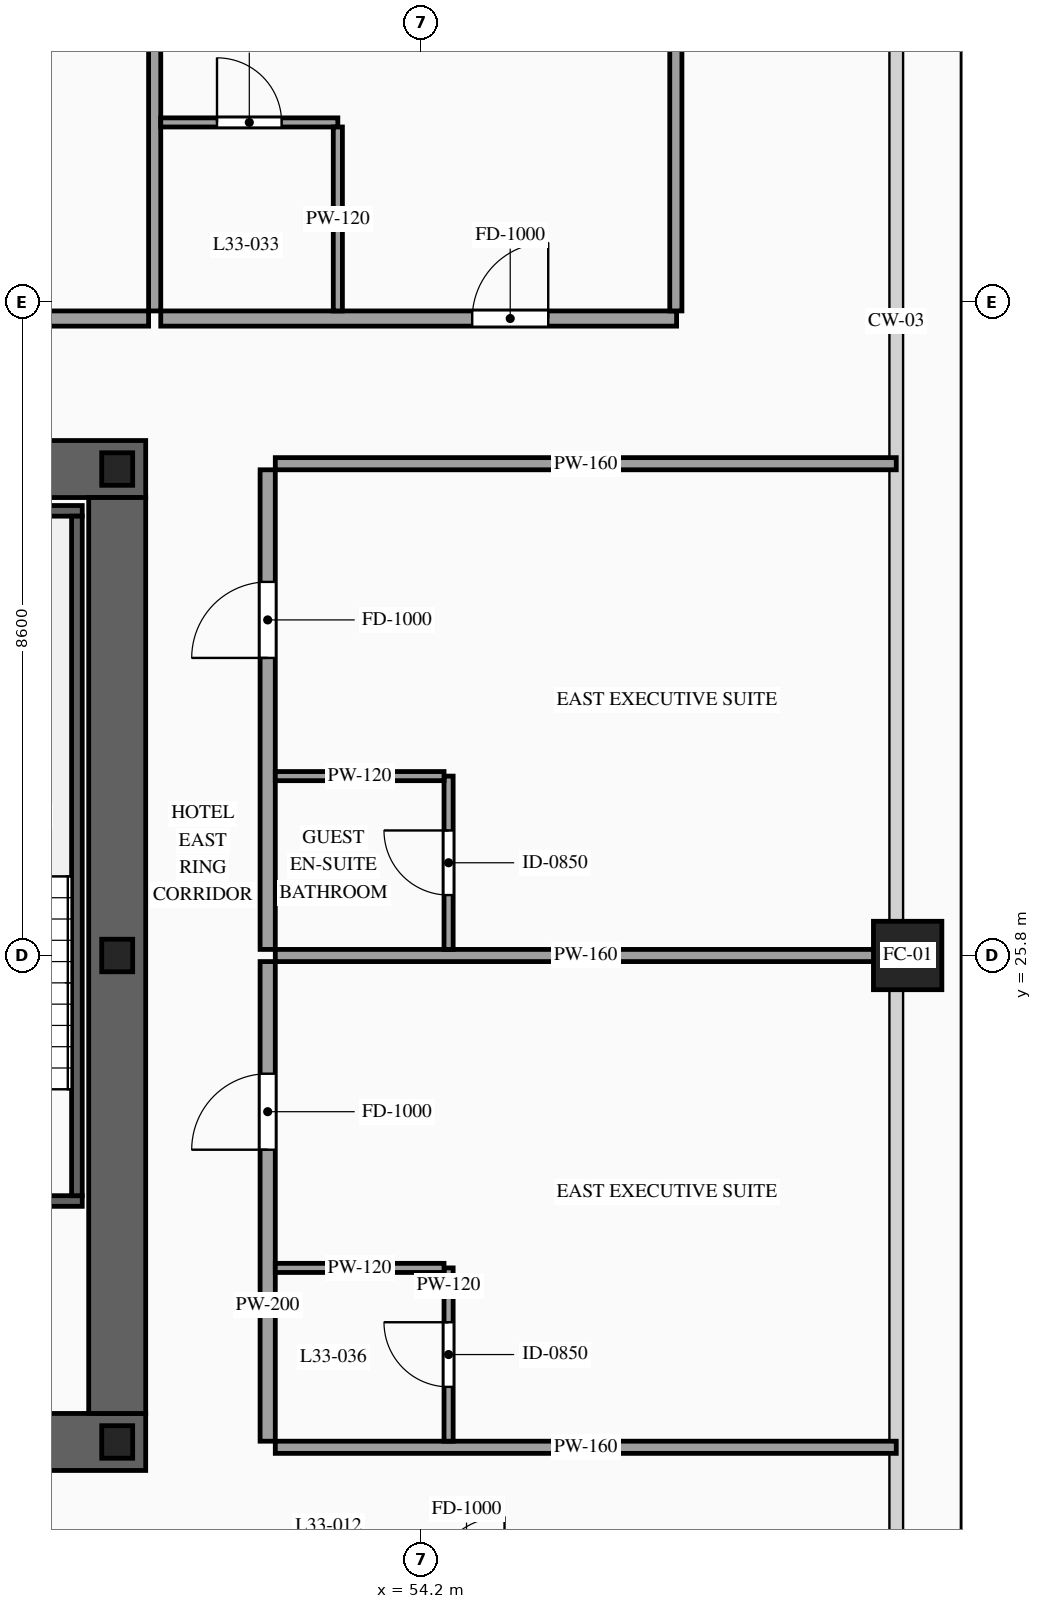
"""IFC4 building model, lengths in metres.
Left out: names, types, materials, properties, quantities, classifications, styles, units other than length and angle.
Written with IfcOpenShell. Run it as: python <this file> out.ifc"""

import sys

from ifc_helpers import new_model, si_unit, direction, frame, frame_2d, origin, origin_2d, place, context, subcontext, project, spatial, rectangle, hollow_rectangle, i_section, extrude, source, transform, mapped, element, fill, save


model = new_model("IFC4")
c1 = context("Model", 3, precision=1e-05, world=origin(), true_north=direction((0.0, 1.0)))
c2 = subcontext(c1, "Body", "Model", "MODEL_VIEW")
j1 = project(units=[si_unit("LENGTHUNIT", "METRE"), si_unit("PLANEANGLEUNIT", "RADIAN")], contexts=[c1])
p1 = place(None, origin())
s1 = spatial("IfcSite", under=j1, at=p1, CompositionType="ELEMENT")
p2 = place(p1, origin())
s2 = spatial("IfcBuilding", under=s1, at=p2, CompositionType="ELEMENT")
p3 = place(p2, frame((0.0, 0.0, 126.2)))
s3 = spatial("IfcBuildingStorey", under=s2, at=p3, CompositionType="ELEMENT", Elevation=126.2)
p4 = place(p3, frame((23.425, 19.4, 0.0), z_axis=(0.0, 0.0, 1.0), x_axis=(1.0, 0.0, 0.0)))
e1 = element("IfcWall", 1, at=p4, inside=s3, PredefinedType="SHEAR", context=c2, shape_type="SweptSolid", body=[
    extrude(rectangle(XDim=27.15, YDim=0.75, at=frame_2d((13.575, 0.0))), origin(), (0.0, 0.0, 1.0), 3.6),
])
p5 = place(p4, frame((2.025, 0.0, 0.0)))
e2 = element("IfcOpeningElement", 2, at=p5, cuts=e1, PredefinedType="OPENING", context=c2, shape_type="SweptSolid", body=[
    extrude(rectangle(XDim=1.1, YDim=2.2, at=frame_2d((0.55, 1.1))), frame((0.0, 0.39, 0.0), z_axis=(0.0, -1.0, 0.0), x_axis=(1.0, 0.0, 0.0)), (0.0, 0.0, 1.0), 0.78),
])
p6 = place(p4, frame((9.925, 0.0, 0.0)))
e3 = element("IfcOpeningElement", 3, at=p6, cuts=e1, PredefinedType="OPENING", context=c2, shape_type="SweptSolid", body=[
    extrude(rectangle(XDim=1.1, YDim=2.2, at=frame_2d((0.55, 1.1))), frame((0.0, 0.39, 0.0), z_axis=(0.0, -1.0, 0.0), x_axis=(1.0, 0.0, 0.0)), (0.0, 0.0, 1.0), 0.78),
])
p7 = place(p4, frame((23.125, 0.0, 0.0)))
e4 = element("IfcOpeningElement", 4, at=p7, cuts=e1, PredefinedType="OPENING", context=c2, shape_type="SweptSolid", body=[
    extrude(rectangle(XDim=1.1, YDim=2.2, at=frame_2d((0.55, 1.1))), frame((0.0, 0.39, 0.0), z_axis=(0.0, -1.0, 0.0), x_axis=(1.0, 0.0, 0.0)), (0.0, 0.0, 1.0), 0.78),
])
p8 = place(p4, frame((19.745, 0.0, 0.0)))
e5 = element("IfcOpeningElement", 5, at=p8, cuts=e1, PredefinedType="OPENING", context=c2, shape_type="SweptSolid", body=[
    extrude(rectangle(XDim=0.9, YDim=2.15, at=frame_2d((0.45, 1.075))), frame((0.0, 0.39, 0.0), z_axis=(0.0, -1.0, 0.0), x_axis=(1.0, 0.0, 0.0)), (0.0, 0.0, 1.0), 0.78),
])
p9 = place(p4, frame((18.305, 0.0, 0.0)))
e6 = element("IfcOpeningElement", 6, at=p9, cuts=e1, PredefinedType="OPENING", context=c2, shape_type="SweptSolid", body=[
    extrude(rectangle(XDim=0.9, YDim=2.15, at=frame_2d((0.45, 1.075))), frame((0.0, 0.39, 0.0), z_axis=(0.0, -1.0, 0.0), x_axis=(1.0, 0.0, 0.0)), (0.0, 0.0, 1.0), 0.78),
])
p10 = place(p3, frame((23.425, 32.2, 0.0), z_axis=(0.0, 0.0, 1.0), x_axis=(1.0, 0.0, 0.0)))
e7 = element("IfcWall", 7, at=p10, inside=s3, PredefinedType="SHEAR", context=c2, shape_type="SweptSolid", body=[
    extrude(rectangle(XDim=27.15, YDim=0.75, at=frame_2d((13.575, 0.0))), origin(), (0.0, 0.0, 1.0), 3.6),
])
p11 = place(p10, frame((4.645, 0.0, 0.0)))
e8 = element("IfcOpeningElement", 8, at=p11, cuts=e7, PredefinedType="OPENING", context=c2, shape_type="SweptSolid", body=[
    extrude(rectangle(XDim=0.9, YDim=2.15, at=frame_2d((0.45, 1.075))), frame((0.0, 0.39, 0.0), z_axis=(0.0, -1.0, 0.0), x_axis=(1.0, 0.0, 0.0)), (0.0, 0.0, 1.0), 0.78),
])
p12 = place(p10, frame((9.925, 0.0, 0.0)))
e9 = element("IfcOpeningElement", 9, at=p12, cuts=e7, PredefinedType="OPENING", context=c2, shape_type="SweptSolid", body=[
    extrude(rectangle(XDim=1.1, YDim=2.2, at=frame_2d((0.55, 1.1))), frame((0.0, 0.39, 0.0), z_axis=(0.0, -1.0, 0.0), x_axis=(1.0, 0.0, 0.0)), (0.0, 0.0, 1.0), 0.78),
])
p13 = place(p10, frame((15.775, 0.0, 0.0)))
e10 = element("IfcOpeningElement", 10, at=p13, cuts=e7, PredefinedType="OPENING", context=c2, shape_type="SweptSolid", body=[
    extrude(rectangle(XDim=1.1, YDim=2.2, at=frame_2d((0.55, 1.1))), frame((0.0, 0.39, 0.0), z_axis=(0.0, -1.0, 0.0), x_axis=(1.0, 0.0, 0.0)), (0.0, 0.0, 1.0), 0.78),
])
m1 = source(origin(), c2, "Body", "SweptSolid", [
    extrude(rectangle(XDim=12.05, YDim=0.75, at=frame_2d((6.025, 0.0))), origin(), (0.0, 0.0, 1.0), 3.6),
])
p14 = place(p3, frame((50.2, 19.775, 0.0), z_axis=(0.0, 0.0, 1.0), x_axis=(0.0, 1.0, 0.0)))
e11 = element("IfcWall", 11, at=p14, inside=s3, PredefinedType="SHEAR", context=c2, shape_type="MappedRepresentation", body=[
    mapped(m1, transform((0.0, 0.0, 0.0), scale=1.0)),
])
m2 = source(origin(), c2, "Body", "SweptSolid", [
    extrude(i_section(OverallWidth=0.407, OverallDepth=0.428, WebThickness=0.02, FlangeThickness=0.035, at=origin_2d()), origin(), (0.0, 0.0, 1.0), 3.6),
])
for number, where, z_axis, x_axis in (
    (12, (50.2, 19.4, 0.0), (0.0, 0.0, 1.0), (1.0, 0.0, 0.0)),
    (13, (50.2, 25.8, 0.0), (0.0, 0.0, 1.0), (1.0, 0.0, 0.0)),
    (14, (50.2, 32.2, 0.0), (0.0, 0.0, 1.0), (1.0, 0.0, 0.0)),
):
    element("IfcColumn", number, at=place(p3, frame(where, z_axis=z_axis, x_axis=x_axis)), inside=s3, PredefinedType="COLUMN", context=c2, shape_type="MappedRepresentation", body=[
        mapped(m2, transform((0.0, 0.0, 0.0), scale=1.0)),
    ])
m3 = source(origin(), c2, "Body", "SweptSolid", [
    extrude(hollow_rectangle(XDim=0.9, YDim=0.9, WallThickness=0.042, at=origin_2d()), origin(), (0.0, 0.0, 1.0), 3.6),
])
p15 = place(p3, frame((60.6, 25.8, 0.0), z_axis=(0.0, 0.0, 1.0), x_axis=(1.0, 0.0, 0.0)))
e15 = element("IfcColumn", 15, at=p15, inside=s3, PredefinedType="COLUMN", context=c2, shape_type="MappedRepresentation", body=[
    mapped(m3, transform((0.0, 0.0, 0.0), scale=1.0)),
])
p16 = place(p3, frame((46.46, 22.57, 0.0), z_axis=(0.0, 0.0, 1.0), x_axis=(1.0, 0.0, 0.0)))
e16 = element("IfcWall", 16, at=p16, inside=s3, PredefinedType="SOLIDWALL", context=c2, shape_type="SweptSolid", body=[
    extrude(rectangle(XDim=3.28, YDim=0.14, at=frame_2d((1.64, 0.0))), origin(), (0.0, 0.0, 1.0), 3.32),
])
p17 = place(p16, frame((1.09, 0.0, 0.0)))
e17 = element("IfcOpeningElement", 17, at=p17, cuts=e16, PredefinedType="OPENING", context=c2, shape_type="SweptSolid", body=[
    extrude(rectangle(XDim=1.1, YDim=2.2, at=frame_2d((0.55, 1.1))), frame((0.0, 0.085, 0.0), z_axis=(0.0, -1.0, 0.0), x_axis=(1.0, 0.0, 0.0)), (0.0, 0.0, 1.0), 0.17),
])
m4 = source(origin(), c2, "Body", "SweptSolid", [
    extrude(rectangle(XDim=3.28, YDim=0.14, at=frame_2d((1.64, 0.0))), origin(), (0.0, 0.0, 1.0), 3.32),
])
p18 = place(p3, frame((46.46, 31.65, 0.0), z_axis=(0.0, 0.0, 1.0), x_axis=(1.0, 0.0, 0.0)))
e18 = element("IfcWall", 18, at=p18, inside=s3, PredefinedType="SOLIDWALL", context=c2, shape_type="MappedRepresentation", body=[
    mapped(m4, transform((0.0, 0.0, 0.0), scale=1.0)),
])
m5 = source(origin(), c2, "Body", "SweptSolid", [
    extrude(rectangle(XDim=8.94, YDim=0.14, at=frame_2d((4.47, 0.0))), origin(), (0.0, 0.0, 1.0), 3.32),
])
p19 = place(p3, frame((49.67, 22.64, 0.0), z_axis=(0.0, 0.0, 1.0), x_axis=(0.0, 1.0, 0.0)))
e19 = element("IfcWall", 19, at=p19, inside=s3, PredefinedType="SOLIDWALL", context=c2, shape_type="MappedRepresentation", body=[
    mapped(m5, transform((0.0, 0.0, 0.0), scale=1.0)),
])
p20 = place(p3, frame((38.93, 34.18, 0.0), z_axis=(0.0, 0.0, 1.0), x_axis=(1.0, 0.0, 0.0)))
e20 = element("IfcWall", 20, at=p20, inside=s3, PredefinedType="PARTITIONING", context=c2, shape_type="SweptSolid", body=[
    extrude(rectangle(XDim=11.683, YDim=0.2, at=frame_2d((5.842, 0.0))), origin(), (0.0, 0.0, 1.0), 3.32),
])
p21 = place(p20, frame((6.547, 0.0, 0.0)))
e21 = element("IfcOpeningElement", 21, at=p21, cuts=e20, PredefinedType="OPENING", context=c2, shape_type="SweptSolid", body=[
    extrude(rectangle(XDim=1.0, YDim=2.2, at=frame_2d((0.5, 1.1))), frame((0.0, 0.115, 0.0), z_axis=(0.0, -1.0, 0.0), x_axis=(1.0, 0.0, 0.0)), (0.0, 0.0, 1.0), 0.23),
])
m6 = source(origin(), c2, "Body", "SweptSolid", [
    extrude(rectangle(XDim=14.97, YDim=0.16, at=frame_2d((7.485, 0.0))), origin(), (0.0, 0.0, 1.0), 3.32),
])
p22 = place(p3, frame((50.693, 34.28, 0.0), z_axis=(0.0, 0.0, 1.0), x_axis=(0.0, 1.0, 0.0)))
e22 = element("IfcWall", 22, at=p22, inside=s3, PredefinedType="PARTITIONING", context=c2, shape_type="MappedRepresentation", body=[
    mapped(m6, transform((0.0, 0.0, 0.0), scale=1.0)),
])
p23 = place(p3, frame((50.773, 34.18, 0.0), z_axis=(0.0, 0.0, 1.0), x_axis=(1.0, 0.0, 0.0)))
e23 = element("IfcWall", 23, at=p23, inside=s3, PredefinedType="PARTITIONING", context=c2, shape_type="SweptSolid", body=[
    extrude(rectangle(XDim=6.787, YDim=0.2, at=frame_2d((3.394, 0.0))), origin(), (0.0, 0.0, 1.0), 3.32),
])
p24 = place(p23, frame((4.098, 0.0, 0.0)))
e24 = element("IfcOpeningElement", 24, at=p24, cuts=e23, PredefinedType="OPENING", context=c2, shape_type="SweptSolid", body=[
    extrude(rectangle(XDim=1.0, YDim=2.2, at=frame_2d((0.5, 1.1))), frame((0.0, 0.115, 0.0), z_axis=(0.0, -1.0, 0.0), x_axis=(1.0, 0.0, 0.0)), (0.0, 0.0, 1.0), 0.23),
])
m7 = source(origin(), c2, "Body", "SweptSolid", [
    extrude(rectangle(XDim=14.82, YDim=0.16, at=frame_2d((7.41, 0.0))), origin(), (0.0, 0.0, 1.0), 3.32),
])
p25 = place(p3, frame((57.55, 34.28, 0.0), z_axis=(0.0, 0.0, 1.0), x_axis=(0.0, 1.0, 0.0)))
e25 = element("IfcWall", 25, at=p25, inside=s3, PredefinedType="PARTITIONING", context=c2, shape_type="MappedRepresentation", body=[
    mapped(m7, transform((0.0, 0.0, 0.0), scale=1.0)),
])
p26 = place(p3, frame((50.773, 36.76, 0.0), z_axis=(0.0, 0.0, 1.0), x_axis=(1.0, 0.0, 0.0)))
e26 = element("IfcWall", 26, at=p26, inside=s3, PredefinedType="PARTITIONING", context=c2, shape_type="SweptSolid", body=[
    extrude(rectangle(XDim=2.33, YDim=0.12, at=frame_2d((1.165, 0.0))), origin(), (0.0, 0.0, 1.0), 3.32),
])
p27 = place(p26, frame((0.74, 0.0, 0.0)))
e27 = element("IfcOpeningElement", 27, at=p27, cuts=e26, PredefinedType="OPENING", context=c2, shape_type="SweptSolid", body=[
    extrude(rectangle(XDim=0.85, YDim=2.1, at=frame_2d((0.425, 1.05))), frame((0.0, 0.075, 0.0), z_axis=(0.0, -1.0, 0.0), x_axis=(1.0, 0.0, 0.0)), (0.0, 0.0, 1.0), 0.15),
])
m8 = source(origin(), c2, "Body", "SweptSolid", [
    extrude(rectangle(XDim=2.42, YDim=0.12, at=frame_2d((1.21, 0.0))), origin(), (0.0, 0.0, 1.0), 3.32),
])
p28 = place(p3, frame((53.103, 34.28, 0.0), z_axis=(0.0, 0.0, 1.0), x_axis=(0.0, 1.0, 0.0)))
e28 = element("IfcWall", 28, at=p28, inside=s3, PredefinedType="PARTITIONING", context=c2, shape_type="MappedRepresentation", body=[
    mapped(m8, transform((0.0, 0.0, 0.0), scale=1.0)),
])
p29 = place(p3, frame((52.18, 19.41, 0.0), z_axis=(0.0, 0.0, 1.0), x_axis=(0.0, 1.0, 0.0)))
e29 = element("IfcWall", 29, at=p29, inside=s3, PredefinedType="PARTITIONING", context=c2, shape_type="SweptSolid", body=[
    extrude(rectangle(XDim=6.31, YDim=0.2, at=frame_2d((3.155, 0.0))), origin(), (0.0, 0.0, 1.0), 3.32),
])
p30 = place(p29, frame((3.835, 0.0, 0.0)))
e30 = element("IfcOpeningElement", 30, at=p30, cuts=e29, PredefinedType="OPENING", context=c2, shape_type="SweptSolid", body=[
    extrude(rectangle(XDim=1.0, YDim=2.2, at=frame_2d((0.5, 1.1))), frame((0.0, 0.115, 0.0), z_axis=(0.0, -1.0, 0.0), x_axis=(1.0, 0.0, 0.0)), (0.0, 0.0, 1.0), 0.23),
])
m9 = source(origin(), c2, "Body", "SweptSolid", [
    extrude(rectangle(XDim=8.17, YDim=0.16, at=frame_2d((4.085, 0.0))), origin(), (0.0, 0.0, 1.0), 2.615),
])
p31 = place(p3, frame((52.28, 25.8, 0.0), z_axis=(0.0, 0.0, 1.0), x_axis=(1.0, 0.0, 0.0)))
e31 = element("IfcWall", 31, at=p31, inside=s3, PredefinedType="PARTITIONING", context=c2, shape_type="MappedRepresentation", body=[
    mapped(m9, transform((0.0, 0.0, 0.0), scale=1.0)),
])
m10 = source(origin(), c2, "Body", "SweptSolid", [
    extrude(rectangle(XDim=8.17, YDim=0.16, at=frame_2d((4.085, 0.0))), origin(), (0.0, 0.0, 1.0), 2.815),
])
p32 = place(p3, frame((52.28, 19.33, 0.0), z_axis=(0.0, 0.0, 1.0), x_axis=(1.0, 0.0, 0.0)))
e32 = element("IfcWall", 32, at=p32, inside=s3, PredefinedType="PARTITIONING", context=c2, shape_type="MappedRepresentation", body=[
    mapped(m10, transform((0.0, 0.0, 0.0), scale=1.0)),
])
p33 = place(p3, frame((54.56, 19.41, 0.0), z_axis=(0.0, 0.0, 1.0), x_axis=(0.0, 1.0, 0.0)))
e33 = element("IfcWall", 33, at=p33, inside=s3, PredefinedType="PARTITIONING", context=c2, shape_type="SweptSolid", body=[
    extrude(rectangle(XDim=2.28, YDim=0.12, at=frame_2d((1.14, 0.0))), origin(), (0.0, 0.0, 1.0), 3.32),
])
p34 = place(p33, frame((0.715, 0.0, 0.0)))
e34 = element("IfcOpeningElement", 34, at=p34, cuts=e33, PredefinedType="OPENING", context=c2, shape_type="SweptSolid", body=[
    extrude(rectangle(XDim=0.85, YDim=2.1, at=frame_2d((0.425, 1.05))), frame((0.0, 0.075, 0.0), z_axis=(0.0, -1.0, 0.0), x_axis=(1.0, 0.0, 0.0)), (0.0, 0.0, 1.0), 0.15),
])
m11 = source(origin(), c2, "Body", "SweptSolid", [
    extrude(rectangle(XDim=2.22, YDim=0.12, at=frame_2d((1.11, 0.0))), origin(), (0.0, 0.0, 1.0), 3.32),
])
p35 = place(p3, frame((52.28, 21.69, 0.0), z_axis=(0.0, 0.0, 1.0), x_axis=(1.0, 0.0, 0.0)))
e35 = element("IfcWall", 35, at=p35, inside=s3, PredefinedType="PARTITIONING", context=c2, shape_type="MappedRepresentation", body=[
    mapped(m11, transform((0.0, 0.0, 0.0), scale=1.0)),
])
p36 = place(p3, frame((52.18, 25.88, 0.0), z_axis=(0.0, 0.0, 1.0), x_axis=(0.0, 1.0, 0.0)))
e36 = element("IfcWall", 36, at=p36, inside=s3, PredefinedType="PARTITIONING", context=c2, shape_type="SweptSolid", body=[
    extrude(rectangle(XDim=6.31, YDim=0.2, at=frame_2d((3.155, 0.0))), origin(), (0.0, 0.0, 1.0), 3.32),
])
p37 = place(p36, frame((3.835, 0.0, 0.0)))
e37 = element("IfcOpeningElement", 37, at=p37, cuts=e36, PredefinedType="OPENING", context=c2, shape_type="SweptSolid", body=[
    extrude(rectangle(XDim=1.0, YDim=2.2, at=frame_2d((0.5, 1.1))), frame((0.0, 0.115, 0.0), z_axis=(0.0, -1.0, 0.0), x_axis=(1.0, 0.0, 0.0)), (0.0, 0.0, 1.0), 0.23),
])
p38 = place(p3, frame((52.28, 32.27, 0.0), z_axis=(0.0, 0.0, 1.0), x_axis=(1.0, 0.0, 0.0)))
e38 = element("IfcWall", 38, at=p38, inside=s3, PredefinedType="PARTITIONING", context=c2, shape_type="MappedRepresentation", body=[
    mapped(m10, transform((0.0, 0.0, 0.0), scale=1.0)),
])
p39 = place(p3, frame((54.56, 25.88, 0.0), z_axis=(0.0, 0.0, 1.0), x_axis=(0.0, 1.0, 0.0)))
e39 = element("IfcWall", 39, at=p39, inside=s3, PredefinedType="PARTITIONING", context=c2, shape_type="SweptSolid", body=[
    extrude(rectangle(XDim=2.28, YDim=0.12, at=frame_2d((1.14, 0.0))), origin(), (0.0, 0.0, 1.0), 3.32),
])
p40 = place(p39, frame((0.715, 0.0, 0.0)))
e40 = element("IfcOpeningElement", 40, at=p40, cuts=e39, PredefinedType="OPENING", context=c2, shape_type="SweptSolid", body=[
    extrude(rectangle(XDim=0.85, YDim=2.1, at=frame_2d((0.425, 1.05))), frame((0.0, 0.075, 0.0), z_axis=(0.0, -1.0, 0.0), x_axis=(1.0, 0.0, 0.0)), (0.0, 0.0, 1.0), 0.15),
])
p41 = place(p3, frame((52.28, 28.16, 0.0), z_axis=(0.0, 0.0, 1.0), x_axis=(1.0, 0.0, 0.0)))
e41 = element("IfcWall", 41, at=p41, inside=s3, PredefinedType="PARTITIONING", context=c2, shape_type="MappedRepresentation", body=[
    mapped(m11, transform((0.0, 0.0, 0.0), scale=1.0)),
])
m12 = source(origin(), c2, "Body", "SweptSolid", [
    extrude(rectangle(XDim=1.0, YDim=2.2, at=frame_2d((0.5, 1.1))), frame((0.0, 0.025, 0.0), z_axis=(0.0, -1.0, 0.0), x_axis=(1.0, 0.0, 0.0)), (0.0, 0.0, 1.0), 0.05),
])
p42 = place(p24, origin())
e42 = element("IfcDoor", 42, at=p42, inside=s3, OperationType="SINGLE_SWING_RIGHT", PredefinedType="DOOR", context=c2, shape_type="MappedRepresentation", body=[
    mapped(m12, transform((0.0, 0.0, 0.0), scale=1.0)),
])
fill(e24, e42)
m13 = source(origin(), c2, "Body", "SweptSolid", [
    extrude(rectangle(XDim=0.85, YDim=2.1, at=frame_2d((0.425, 1.05))), frame((0.0, 0.025, 0.0), z_axis=(0.0, -1.0, 0.0), x_axis=(1.0, 0.0, 0.0)), (0.0, 0.0, 1.0), 0.05),
])
p43 = place(p27, origin())
e43 = element("IfcDoor", 43, at=p43, inside=s3, OperationType="SINGLE_SWING_LEFT", PredefinedType="DOOR", context=c2, shape_type="MappedRepresentation", body=[
    mapped(m13, transform((0.0, 0.0, 0.0), scale=1.0)),
])
fill(e27, e43)
p44 = place(p30, origin())
e44 = element("IfcDoor", 44, at=p44, inside=s3, OperationType="SINGLE_SWING_LEFT", PredefinedType="DOOR", context=c2, shape_type="MappedRepresentation", body=[
    mapped(m12, transform((0.0, 0.0, 0.0), scale=1.0)),
])
fill(e30, e44)
p45 = place(p34, origin())
e45 = element("IfcDoor", 45, at=p45, inside=s3, OperationType="SINGLE_SWING_RIGHT", PredefinedType="DOOR", context=c2, shape_type="MappedRepresentation", body=[
    mapped(m13, transform((0.0, 0.0, 0.0), scale=1.0)),
])
fill(e34, e45)
p46 = place(p37, origin())
e46 = element("IfcDoor", 46, at=p46, inside=s3, OperationType="SINGLE_SWING_LEFT", PredefinedType="DOOR", context=c2, shape_type="MappedRepresentation", body=[
    mapped(m12, transform((0.0, 0.0, 0.0), scale=1.0)),
])
fill(e37, e46)
p47 = place(p40, origin())
e47 = element("IfcDoor", 47, at=p47, inside=s3, OperationType="SINGLE_SWING_RIGHT", PredefinedType="DOOR", context=c2, shape_type="MappedRepresentation", body=[
    mapped(m13, transform((0.0, 0.0, 0.0), scale=1.0)),
])
fill(e40, e47)
save(model, sys.argv[1])
